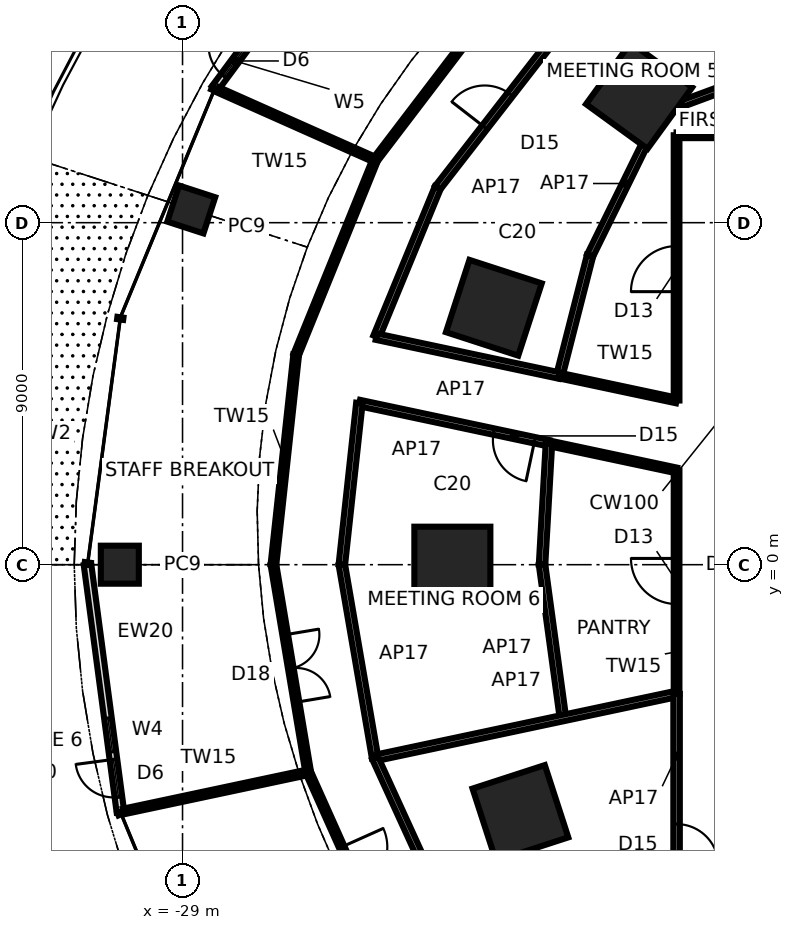
"""IFC4 building model, lengths in metres.
Left out: names, types, materials, properties, quantities, classifications, styles, units other than length and angle.
Written with IfcOpenShell. Run it as: python <this file> out.ifc"""

import sys

from ifc_helpers import new_model, si_unit, direction, frame, frame_2d, origin, origin_2d, place, context, subcontext, project, spatial, rectangle, extrude, element, fill, save


model = new_model("IFC4")
c1 = context("Model", 3, precision=1e-05, world=origin(), true_north=direction((0.0, 1.0)))
c2 = subcontext(c1, "Body", "Model", "MODEL_VIEW")
j1 = project(units=[si_unit("LENGTHUNIT", "METRE"), si_unit("PLANEANGLEUNIT", "RADIAN")], contexts=[c1])
p1 = place(None, origin())
s1 = spatial("IfcSite", under=j1, at=p1, CompositionType="ELEMENT")
p2 = place(p1, origin())
s2 = spatial("IfcBuilding", under=s1, at=p2, CompositionType="ELEMENT")
p3 = place(p2, frame((0.0, 0.0, 15.1)))
s3 = spatial("IfcBuildingStorey", under=s2, at=p3, CompositionType="ELEMENT", Elevation=15.1)
for number, where, z_axis, x_axis in (
    (1, (-16.986, 12.341, 0.0), (0.0, 0.0, 1.0), (-0.809, 0.588, 0.0)),
    (2, (-20.808, 6.761, 0.0), (0.0, 0.0, 1.0), (-0.951, 0.309, 0.0)),
    (3, (-21.9, 0.0, 0.0), (0.0, 0.0, 1.0), (-1.0, 0.0, 0.0)),
    (4, (-20.109, -6.534, 0.0), (0.0, 0.0, 1.0), (-0.951, -0.309, 0.0)),
):
    element("IfcColumn", number, at=place(p3, frame(where, z_axis=z_axis, x_axis=x_axis)), inside=s3, PredefinedType="COLUMN", context=c2, shape_type="SweptSolid", body=[
        extrude(rectangle(XDim=2.0, YDim=2.0, at=origin_2d()), origin(), (0.0, 0.0, 1.0), 4.5),
    ])
for number, where, z_axis, x_axis in (
    (5, (-28.77, 9.348, 0.0), (0.0, 0.0, 1.0), (-0.951, 0.309, 0.0)),
    (6, (-30.65, 0.0, 0.0), (0.0, 0.0, 1.0), (-1.0, 0.0, 0.0)),
):
    element("IfcColumn", number, at=place(p3, frame(where, z_axis=z_axis, x_axis=x_axis)), inside=s3, PredefinedType="COLUMN", context=c2, shape_type="SweptSolid", body=[
        extrude(rectangle(XDim=1.0, YDim=1.0, at=origin_2d()), origin(), (0.0, 0.0, 1.0), 4.5),
    ])
p4 = place(p3, frame((-24.332, 17.678, 0.0), z_axis=(0.0, 0.0, 1.0), x_axis=(-0.595729578383, -0.803185077949, 0.0)))
e7 = element("IfcWall", 7, at=p4, inside=s3, PredefinedType="SOLIDWALL", context=c2, shape_type="SweptSolid", body=[
    extrude(rectangle(XDim=6.407, YDim=0.2, at=frame_2d((3.203, 0.0))), origin(), (0.0, 0.0, 1.0), 4.3),
])
p5 = place(p4, frame((5.007, 0.0, 0.0)))
e8 = element("IfcOpeningElement", 8, at=p5, cuts=e7, PredefinedType="OPENING", context=c2, shape_type="SweptSolid", body=[
    extrude(rectangle(XDim=1.0, YDim=2.4, at=frame_2d((0.5, 1.2))), frame((0.0, 0.11, 0.0), z_axis=(0.0, -1.0, 0.0), x_axis=(1.0, 0.0, 0.0)), (0.0, 0.0, 1.0), 0.22),
])
p6 = place(p4, frame((3.907, 0.0, 0.3)))
e9 = element("IfcOpeningElement", 9, at=p6, cuts=e7, PredefinedType="OPENING", context=c2, shape_type="SweptSolid", body=[
    extrude(rectangle(XDim=0.9, YDim=2.1, at=frame_2d((0.45, 1.05))), frame((0.0, 0.11, 0.0), z_axis=(0.0, -1.0, 0.0), x_axis=(1.0, 0.0, 0.0)), (0.0, 0.0, 1.0), 0.22),
])
p7 = place(p4, frame((5.007, 0.0, 2.7)))
e10 = element("IfcOpeningElement", 10, at=p7, cuts=e7, PredefinedType="OPENING", context=c2, shape_type="SweptSolid", body=[
    extrude(rectangle(XDim=1.0, YDim=0.6, at=frame_2d((0.5, 0.3))), frame((0.0, 0.11, 0.0), z_axis=(0.0, -1.0, 0.0), x_axis=(1.0, 0.0, 0.0)), (0.0, 0.0, 1.0), 0.22),
])
p8 = place(p3, frame((-31.5, 0.0, 0.0), z_axis=(0.0, 0.0, 1.0), x_axis=(0.131830186359, -0.991272314737, 0.0)))
e11 = element("IfcWall", 11, at=p8, inside=s3, PredefinedType="SOLIDWALL", context=c2, shape_type="SweptSolid", body=[
    extrude(rectangle(XDim=6.569, YDim=0.2, at=frame_2d((3.284, 0.0))), origin(), (0.0, 0.0, 1.0), 4.3),
])
p9 = place(p8, frame((5.169, 0.0, 0.0)))
e12 = element("IfcOpeningElement", 12, at=p9, cuts=e11, PredefinedType="OPENING", context=c2, shape_type="SweptSolid", body=[
    extrude(rectangle(XDim=1.0, YDim=2.4, at=frame_2d((0.5, 1.2))), frame((0.0, 0.11, 0.0), z_axis=(0.0, -1.0, 0.0), x_axis=(1.0, 0.0, 0.0)), (0.0, 0.0, 1.0), 0.22),
])
p10 = place(p8, frame((4.069, 0.0, 0.3)))
e13 = element("IfcOpeningElement", 13, at=p10, cuts=e11, PredefinedType="OPENING", context=c2, shape_type="SweptSolid", body=[
    extrude(rectangle(XDim=0.9, YDim=2.1, at=frame_2d((0.45, 1.05))), frame((0.0, 0.11, 0.0), z_axis=(0.0, -1.0, 0.0), x_axis=(1.0, 0.0, 0.0)), (0.0, 0.0, 1.0), 0.22),
])
p11 = place(p8, frame((5.169, 0.0, 2.7)))
e14 = element("IfcOpeningElement", 14, at=p11, cuts=e11, PredefinedType="OPENING", context=c2, shape_type="SweptSolid", body=[
    extrude(rectangle(XDim=1.0, YDim=0.6, at=frame_2d((0.5, 0.3))), frame((0.0, 0.11, 0.0), z_axis=(0.0, -1.0, 0.0), x_axis=(1.0, 0.0, 0.0)), (0.0, 0.0, 1.0), 0.22),
])
p12 = place(p3, frame((-16.0, 2.481, 0.0), z_axis=(0.0, 0.0, 1.0), x_axis=(0.0, -1.0, 0.0)))
e15 = element("IfcWall", 15, at=p12, inside=s3, PredefinedType="PARTITIONING", context=c2, shape_type="SweptSolid", body=[
    extrude(rectangle(XDim=5.882, YDim=0.15, at=frame_2d((2.941, 0.0))), origin(), (0.0, 0.0, 1.0), 4.3),
])
p13 = place(p12, frame((2.316, 0.0, 0.0)))
e16 = element("IfcOpeningElement", 16, at=p13, cuts=e15, PredefinedType="OPENING", context=c2, shape_type="SweptSolid", body=[
    extrude(rectangle(XDim=1.2, YDim=2.4, at=frame_2d((0.6, 1.2))), frame((0.0, 0.085, 0.0), z_axis=(0.0, -1.0, 0.0), x_axis=(1.0, 0.0, 0.0)), (0.0, 0.0, 1.0), 0.17),
])
p14 = place(p3, frame((-23.932, -5.087, 0.0), z_axis=(0.0, 0.0, 1.0), x_axis=(-0.169704177239, 0.985495049317, 0.0)))
e17 = element("IfcWall", 17, at=p14, inside=s3, PredefinedType="PARTITIONING", context=c2, shape_type="SweptSolid", body=[
    extrude(rectangle(XDim=5.162, YDim=0.17, at=frame_2d((2.581, 0.0))), origin(), (0.0, 0.0, 1.0), 4.3),
])
p15 = place(p3, frame((-26.608, 0.0, 0.0), z_axis=(0.0, 0.0, 1.0), x_axis=(0.165292631836, -0.986244566961, 0.0)))
e18 = element("IfcWall", 18, at=p15, inside=s3, PredefinedType="PARTITIONING", context=c2, shape_type="SweptSolid", body=[
    extrude(rectangle(XDim=5.537, YDim=0.15, at=frame_2d((2.769, 0.0))), origin(), (0.0, 0.0, 1.0), 4.3),
])
p16 = place(p15, frame((1.869, 0.0, 0.0)))
e19 = element("IfcOpeningElement", 19, at=p16, cuts=e18, PredefinedType="OPENING", context=c2, shape_type="SweptSolid", body=[
    extrude(rectangle(XDim=1.8, YDim=2.4, at=frame_2d((0.9, 1.2))), frame((0.0, 0.085, 0.0), z_axis=(0.0, -1.0, 0.0), x_axis=(1.0, 0.0, 0.0)), (0.0, 0.0, 1.0), 0.17),
])
p17 = place(p3, frame((-18.99, -4.036, 0.0), z_axis=(0.0, 0.0, 1.0), x_axis=(-0.135024948545, 0.990842198975, 0.0)))
e20 = element("IfcWall", 20, at=p17, inside=s3, PredefinedType="PARTITIONING", context=c2, shape_type="SweptSolid", body=[
    extrude(rectangle(XDim=4.074, YDim=0.17, at=frame_2d((2.037, 0.0))), origin(), (0.0, 0.0, 1.0), 4.3),
])
p18 = place(p3, frame((-23.932, -5.087, 0.0), z_axis=(0.0, 0.0, 1.0), x_axis=(0.97814737229, 0.20791276556, 0.0)))
e21 = element("IfcWall", 21, at=p18, inside=s3, PredefinedType="PARTITIONING", context=c2, shape_type="SweptSolid", body=[
    extrude(rectangle(XDim=8.109, YDim=0.17, at=frame_2d((4.055, 0.0))), origin(), (0.0, 0.0, 1.0), 4.3),
])
p19 = place(p3, frame((-25.693, -5.461, 0.0), z_axis=(0.0, 0.0, 1.0), x_axis=(-0.978146743391, -0.207915724259, 0.0)))
e22 = element("IfcWall", 22, at=p19, inside=s3, PredefinedType="PARTITIONING", context=c2, shape_type="SweptSolid", body=[
    extrude(rectangle(XDim=4.972, YDim=0.15, at=frame_2d((2.486, 0.0))), origin(), (0.0, 0.0, 1.0), 4.3),
])
p20 = place(p3, frame((-21.816, -9.713, 0.0), z_axis=(0.0, 0.0, 1.0), x_axis=(-0.415942352912, 0.909390982501, 0.0)))
e23 = element("IfcWall", 23, at=p20, inside=s3, PredefinedType="PARTITIONING", context=c2, shape_type="SweptSolid", body=[
    extrude(rectangle(XDim=5.087, YDim=0.17, at=frame_2d((2.543, 0.0))), origin(), (0.0, 0.0, 1.0), 4.3),
])
p21 = place(p3, frame((-25.693, -5.461, 0.0), z_axis=(0.0, 0.0, 1.0), x_axis=(0.408737544403, -0.912651970795, 0.0)))
e24 = element("IfcWall", 24, at=p21, inside=s3, PredefinedType="PARTITIONING", context=c2, shape_type="SweptSolid", body=[
    extrude(rectangle(XDim=5.461, YDim=0.15, at=frame_2d((2.73, 0.0))), origin(), (0.0, 0.0, 1.0), 4.3),
])
p22 = place(p21, frame((2.156, 0.0, 0.0)))
e25 = element("IfcOpeningElement", 25, at=p22, cuts=e24, PredefinedType="OPENING", context=c2, shape_type="SweptSolid", body=[
    extrude(rectangle(XDim=1.2, YDim=2.4, at=frame_2d((0.6, 1.2))), frame((0.0, 0.085, 0.0), z_axis=(0.0, -1.0, 0.0), x_axis=(1.0, 0.0, 0.0)), (0.0, 0.0, 1.0), 0.17),
])
p23 = place(p3, frame((-16.0, -3.401, 0.0), z_axis=(0.0, 0.0, 1.0), x_axis=(0.0, -1.0, 0.0)))
e26 = element("IfcWall", 26, at=p23, inside=s3, PredefinedType="PARTITIONING", context=c2, shape_type="SweptSolid", body=[
    extrude(rectangle(XDim=7.899, YDim=0.17, at=frame_2d((3.95, 0.0))), origin(), (0.0, 0.0, 1.0), 4.3),
])
p24 = place(p23, frame((3.425, 0.0, 0.0)))
e27 = element("IfcOpeningElement", 27, at=p24, cuts=e26, PredefinedType="OPENING", context=c2, shape_type="SweptSolid", body=[
    extrude(rectangle(XDim=1.1, YDim=2.4, at=frame_2d((0.55, 1.2))), frame((0.0, 0.095, 0.0), z_axis=(0.0, -1.0, 0.0), x_axis=(1.0, 0.0, 0.0)), (0.0, 0.0, 1.0), 0.19),
])
p25 = place(p3, frame((6.524, 11.3, 0.0), z_axis=(0.0, 0.0, 1.0), x_axis=(-1.0, 0.0, 0.0)))
e28 = element("IfcWall", 28, at=p25, inside=s3, PredefinedType="PARTITIONING", context=c2, shape_type="SweptSolid", body=[
    extrude(rectangle(XDim=22.524, YDim=0.15, at=frame_2d((11.262, 0.0))), origin(), (0.0, 0.0, 1.0), 4.3),
])
p26 = place(p25, frame((10.393, 0.0, 0.0)))
e29 = element("IfcOpeningElement", 29, at=p26, cuts=e28, PredefinedType="OPENING", context=c2, shape_type="SweptSolid", body=[
    extrude(rectangle(XDim=1.2, YDim=2.4, at=frame_2d((0.6, 1.2))), frame((0.0, 0.085, 0.0), z_axis=(0.0, -1.0, 0.0), x_axis=(1.0, 0.0, 0.0)), (0.0, 0.0, 1.0), 0.17),
])
p27 = place(p25, frame((2.068, 0.0, 0.0)))
e30 = element("IfcOpeningElement", 30, at=p27, cuts=e28, PredefinedType="OPENING", context=c2, shape_type="SweptSolid", body=[
    extrude(rectangle(XDim=1.2, YDim=2.4, at=frame_2d((0.6, 1.2))), frame((0.0, 0.085, 0.0), z_axis=(0.0, -1.0, 0.0), x_axis=(1.0, 0.0, 0.0)), (0.0, 0.0, 1.0), 0.17),
])
p28 = place(p3, frame((-12.156, 13.5, 0.0), z_axis=(0.0, 0.0, 1.0), x_axis=(-0.669135077133, 0.74314079995, 0.0)))
e31 = element("IfcWall", 31, at=p28, inside=s3, PredefinedType="PARTITIONING", context=c2, shape_type="SweptSolid", body=[
    extrude(rectangle(XDim=4.671, YDim=0.17, at=frame_2d((2.336, 0.0))), origin(), (0.0, 0.0, 1.0), 4.3),
])
p29 = place(p3, frame((-16.413, 11.925, 0.0), z_axis=(0.0, 0.0, 1.0), x_axis=(0.937814922048, 0.34713566798, 0.0)))
e32 = element("IfcWall", 32, at=p29, inside=s3, PredefinedType="PARTITIONING", context=c2, shape_type="SweptSolid", body=[
    extrude(rectangle(XDim=4.539, YDim=0.17, at=frame_2d((2.27, 0.0))), origin(), (0.0, 0.0, 1.0), 4.3),
])
p30 = place(p3, frame((-18.276, 8.137, 0.0), z_axis=(0.0, 0.0, 1.0), x_axis=(0.44142043443, 0.897300395669, 0.0)))
e33 = element("IfcWall", 33, at=p30, inside=s3, PredefinedType="PARTITIONING", context=c2, shape_type="SweptSolid", body=[
    extrude(rectangle(XDim=4.221, YDim=0.17, at=frame_2d((2.111, 0.0))), origin(), (0.0, 0.0, 1.0), 4.3),
])
p31 = place(p3, frame((-20.627, 14.986, 0.0), z_axis=(0.0, 0.0, 1.0), x_axis=(-0.606135035954, -0.795361753034, 0.0)))
e34 = element("IfcWall", 34, at=p31, inside=s3, PredefinedType="PARTITIONING", context=c2, shape_type="SweptSolid", body=[
    extrude(rectangle(XDim=5.447, YDim=0.15, at=frame_2d((2.724, 0.0))), origin(), (0.0, 0.0, 1.0), 4.3),
])
p32 = place(p3, frame((-22.284, 9.921, 0.0), z_axis=(0.0, 0.0, 1.0), x_axis=(0.613607456707, 0.789611226537, 0.0)))
e35 = element("IfcWall", 35, at=p32, inside=s3, PredefinedType="PARTITIONING", context=c2, shape_type="SweptSolid", body=[
    extrude(rectangle(XDim=5.074, YDim=0.17, at=frame_2d((2.537, 0.0))), origin(), (0.0, 0.0, 1.0), 4.3),
])
p33 = place(p32, frame((2.012, 0.0, 0.0)))
e36 = element("IfcOpeningElement", 36, at=p33, cuts=e35, PredefinedType="OPENING", context=c2, shape_type="SweptSolid", body=[
    extrude(rectangle(XDim=1.1, YDim=2.4, at=frame_2d((0.55, 1.2))), frame((0.0, 0.095, 0.0), z_axis=(0.0, -1.0, 0.0), x_axis=(1.0, 0.0, 0.0)), (0.0, 0.0, 1.0), 0.19),
])
p34 = place(p3, frame((-16.0, 11.3, 0.0), z_axis=(0.0, 0.0, 1.0), x_axis=(0.0, -1.0, 0.0)))
e37 = element("IfcWall", 37, at=p34, inside=s3, PredefinedType="PARTITIONING", context=c2, shape_type="SweptSolid", body=[
    extrude(rectangle(XDim=6.979, YDim=0.15, at=frame_2d((3.49, 0.0))), origin(), (0.0, 0.0, 1.0), 4.3),
])
p35 = place(p34, frame((2.915, 0.0, 0.0)))
e38 = element("IfcOpeningElement", 38, at=p35, cuts=e37, PredefinedType="OPENING", context=c2, shape_type="SweptSolid", body=[
    extrude(rectangle(XDim=1.2, YDim=2.4, at=frame_2d((0.6, 1.2))), frame((0.0, 0.085, 0.0), z_axis=(0.0, -1.0, 0.0), x_axis=(1.0, 0.0, 0.0)), (0.0, 0.0, 1.0), 0.17),
])
p36 = place(p3, frame((-23.928, 10.654, 0.0), z_axis=(0.0, 0.0, 1.0), x_axis=(-0.913547449471, 0.406732169326, 0.0)))
e39 = element("IfcWall", 39, at=p36, inside=s3, PredefinedType="PARTITIONING", context=c2, shape_type="SweptSolid", body=[
    extrude(rectangle(XDim=4.54, YDim=0.15, at=frame_2d((2.27, 0.0))), origin(), (0.0, 0.0, 1.0), 4.3),
])
p37 = place(p3, frame((-19.083, 4.976, 0.0), z_axis=(0.0, 0.0, 1.0), x_axis=(0.247568605717, 0.968870365665, 0.0)))
e40 = element("IfcWall", 40, at=p37, inside=s3, PredefinedType="PARTITIONING", context=c2, shape_type="SweptSolid", body=[
    extrude(rectangle(XDim=3.262, YDim=0.17, at=frame_2d((1.631, 0.0))), origin(), (0.0, 0.0, 1.0), 4.3),
])
p38 = place(p3, frame((-23.9, 6.0, 0.0), z_axis=(0.0, 0.0, 1.0), x_axis=(0.381027738685, 0.92456360644, 0.0)))
e41 = element("IfcWall", 41, at=p38, inside=s3, PredefinedType="PARTITIONING", context=c2, shape_type="SweptSolid", body=[
    extrude(rectangle(XDim=4.241, YDim=0.17, at=frame_2d((2.121, 0.0))), origin(), (0.0, 0.0, 1.0), 4.3),
])
p39 = place(p3, frame((-23.928, 10.654, 0.0), z_axis=(0.0, 0.0, 1.0), x_axis=(-0.376134336796, -0.92656514109, 0.0)))
e42 = element("IfcWall", 42, at=p39, inside=s3, PredefinedType="PARTITIONING", context=c2, shape_type="SweptSolid", body=[
    extrude(rectangle(XDim=5.531, YDim=0.15, at=frame_2d((2.766, 0.0))), origin(), (0.0, 0.0, 1.0), 4.3),
])
p40 = place(p3, frame((-16.0, 4.321, 0.0), z_axis=(0.0, 0.0, 1.0), x_axis=(-0.978156882567, 0.207868018433, 0.0)))
e43 = element("IfcWall", 43, at=p40, inside=s3, PredefinedType="PARTITIONING", context=c2, shape_type="SweptSolid", body=[
    extrude(rectangle(XDim=3.152, YDim=0.15, at=frame_2d((1.576, 0.0))), origin(), (0.0, 0.0, 1.0), 4.3),
])
p41 = place(p3, frame((-19.083, 4.976, 0.0), z_axis=(0.0, 0.0, 1.0), x_axis=(-0.97814070171, 0.207944145528, 0.0)))
e44 = element("IfcWall", 44, at=p41, inside=s3, PredefinedType="PARTITIONING", context=c2, shape_type="SweptSolid", body=[
    extrude(rectangle(XDim=4.924, YDim=0.17, at=frame_2d((2.462, 0.0))), origin(), (0.0, 0.0, 1.0), 4.3),
])
p42 = place(p3, frame((-24.346, 4.255, 0.0), z_axis=(0.0, 0.0, 1.0), x_axis=(0.978143029593, -0.20793319518, 0.0)))
e45 = element("IfcWall", 45, at=p42, inside=s3, PredefinedType="PARTITIONING", context=c2, shape_type="SweptSolid", body=[
    extrude(rectangle(XDim=5.099, YDim=0.17, at=frame_2d((2.55, 0.0))), origin(), (0.0, 0.0, 1.0), 4.3),
])
p43 = place(p42, frame((3.616, 0.0, 0.0)))
e46 = element("IfcOpeningElement", 46, at=p43, cuts=e45, PredefinedType="OPENING", context=c2, shape_type="SweptSolid", body=[
    extrude(rectangle(XDim=1.1, YDim=2.4, at=frame_2d((0.55, 1.2))), frame((0.0, 0.095, 0.0), z_axis=(0.0, -1.0, 0.0), x_axis=(1.0, 0.0, 0.0)), (0.0, 0.0, 1.0), 0.19),
])
p44 = place(p3, frame((-19.358, 3.195, 0.0), z_axis=(0.0, 0.0, 1.0), x_axis=(0.978143486216, -0.207931047161, 0.0)))
e47 = element("IfcWall", 47, at=p44, inside=s3, PredefinedType="PARTITIONING", context=c2, shape_type="SweptSolid", body=[
    extrude(rectangle(XDim=3.433, YDim=0.15, at=frame_2d((1.717, 0.0))), origin(), (0.0, 0.0, 1.0), 4.3),
])
p45 = place(p3, frame((-26.009, 5.528, 0.0), z_axis=(0.0, 0.0, 1.0), x_axis=(-0.107698829118, -0.994183565649, 0.0)))
e48 = element("IfcWall", 48, at=p45, inside=s3, PredefinedType="PARTITIONING", context=c2, shape_type="SweptSolid", body=[
    extrude(rectangle(XDim=5.561, YDim=0.15, at=frame_2d((2.78, 0.0))), origin(), (0.0, 0.0, 1.0), 4.3),
])
p46 = place(p3, frame((-24.808, 0.0, 0.0), z_axis=(0.0, 0.0, 1.0), x_axis=(0.107983193609, 0.994152719605, 0.0)))
e49 = element("IfcWall", 49, at=p46, inside=s3, PredefinedType="PARTITIONING", context=c2, shape_type="SweptSolid", body=[
    extrude(rectangle(XDim=4.28, YDim=0.17, at=frame_2d((2.14, 0.0))), origin(), (0.0, 0.0, 1.0), 4.3),
])
p47 = place(p3, frame((-19.54, 0.0, 0.0), z_axis=(0.0, 0.0, 1.0), x_axis=(0.056843363857, 0.998383108824, 0.0)))
e50 = element("IfcWall", 50, at=p47, inside=s3, PredefinedType="PARTITIONING", context=c2, shape_type="SweptSolid", body=[
    extrude(rectangle(XDim=3.2, YDim=0.17, at=frame_2d((1.6, 0.0))), origin(), (0.0, 0.0, 1.0), 4.3),
])
p48 = place(p5, frame((1.0, 0.0, 0.0), z_axis=(0.0, 0.0, 1.0), x_axis=(-1.0, 0.0, 0.0)))
e51 = element("IfcDoor", 51, at=p48, inside=s3, OperationType="SINGLE_SWING_RIGHT", PredefinedType="DOOR", context=c2, shape_type="SweptSolid", body=[
    extrude(rectangle(XDim=1.0, YDim=2.4, at=frame_2d((0.5, 1.2))), frame((0.0, 0.025, 0.0), z_axis=(0.0, -1.0, 0.0), x_axis=(1.0, 0.0, 0.0)), (0.0, 0.0, 1.0), 0.05),
])
fill(e8, e51)
p49 = place(p7, origin())
e52 = element("IfcWindow", 52, at=p49, inside=s3, PartitioningType="SINGLE_PANEL", PredefinedType="WINDOW", context=c2, shape_type="SweptSolid", body=[
    extrude(rectangle(XDim=1.0, YDim=0.6, at=frame_2d((0.5, 0.3))), frame((0.0, 0.03, 0.0), z_axis=(0.0, -1.0, 0.0), x_axis=(1.0, 0.0, 0.0)), (0.0, 0.0, 1.0), 0.06),
])
fill(e10, e52)
p50 = place(p9, frame((1.0, 0.0, 0.0), z_axis=(0.0, 0.0, 1.0), x_axis=(-1.0, 0.0, 0.0)))
e53 = element("IfcDoor", 53, at=p50, inside=s3, OperationType="SINGLE_SWING_RIGHT", PredefinedType="DOOR", context=c2, shape_type="SweptSolid", body=[
    extrude(rectangle(XDim=1.0, YDim=2.4, at=frame_2d((0.5, 1.2))), frame((0.0, 0.025, 0.0), z_axis=(0.0, -1.0, 0.0), x_axis=(1.0, 0.0, 0.0)), (0.0, 0.0, 1.0), 0.05),
])
fill(e12, e53)
p51 = place(p10, origin())
e54 = element("IfcWindow", 54, at=p51, inside=s3, PartitioningType="SINGLE_PANEL", PredefinedType="WINDOW", context=c2, shape_type="SweptSolid", body=[
    extrude(rectangle(XDim=0.9, YDim=2.1, at=frame_2d((0.45, 1.05))), frame((0.0, 0.03, 0.0), z_axis=(0.0, -1.0, 0.0), x_axis=(1.0, 0.0, 0.0)), (0.0, 0.0, 1.0), 0.06),
])
fill(e13, e54)
p52 = place(p11, origin())
e55 = element("IfcWindow", 55, at=p52, inside=s3, PartitioningType="SINGLE_PANEL", PredefinedType="WINDOW", context=c2, shape_type="SweptSolid", body=[
    extrude(rectangle(XDim=1.0, YDim=0.6, at=frame_2d((0.5, 0.3))), frame((0.0, 0.03, 0.0), z_axis=(0.0, -1.0, 0.0), x_axis=(1.0, 0.0, 0.0)), (0.0, 0.0, 1.0), 0.06),
])
fill(e14, e55)
p53 = place(p24, origin())
e56 = element("IfcDoor", 56, at=p53, inside=s3, OperationType="SINGLE_SWING_RIGHT", PredefinedType="DOOR", context=c2, shape_type="SweptSolid", body=[
    extrude(rectangle(XDim=1.1, YDim=2.4, at=frame_2d((0.55, 1.2))), frame((0.0, 0.025, 0.0), z_axis=(0.0, -1.0, 0.0), x_axis=(1.0, 0.0, 0.0)), (0.0, 0.0, 1.0), 0.05),
])
fill(e27, e56)
p54 = place(p35, frame((1.2, 0.0, 0.0), z_axis=(0.0, 0.0, 1.0), x_axis=(-1.0, 0.0, 0.0)))
e57 = element("IfcDoor", 57, at=p54, inside=s3, OperationType="SINGLE_SWING_LEFT", PredefinedType="DOOR", context=c2, shape_type="SweptSolid", body=[
    extrude(rectangle(XDim=1.2, YDim=2.4, at=frame_2d((0.6, 1.2))), frame((0.0, 0.025, 0.0), z_axis=(0.0, -1.0, 0.0), x_axis=(1.0, 0.0, 0.0)), (0.0, 0.0, 1.0), 0.05),
])
fill(e38, e57)
p55 = place(p13, frame((1.2, 0.0, 0.0), z_axis=(0.0, 0.0, 1.0), x_axis=(-1.0, 0.0, 0.0)))
e58 = element("IfcDoor", 58, at=p55, inside=s3, OperationType="SINGLE_SWING_RIGHT", PredefinedType="DOOR", context=c2, shape_type="SweptSolid", body=[
    extrude(rectangle(XDim=1.2, YDim=2.4, at=frame_2d((0.6, 1.2))), frame((0.0, 0.025, 0.0), z_axis=(0.0, -1.0, 0.0), x_axis=(1.0, 0.0, 0.0)), (0.0, 0.0, 1.0), 0.05),
])
fill(e16, e58)
p56 = place(p33, origin())
e59 = element("IfcDoor", 59, at=p56, inside=s3, OperationType="SINGLE_SWING_LEFT", PredefinedType="DOOR", context=c2, shape_type="SweptSolid", body=[
    extrude(rectangle(XDim=1.1, YDim=2.4, at=frame_2d((0.55, 1.2))), frame((0.0, 0.025, 0.0), z_axis=(0.0, -1.0, 0.0), x_axis=(1.0, 0.0, 0.0)), (0.0, 0.0, 1.0), 0.05),
])
fill(e36, e59)
p57 = place(p43, frame((1.1, 0.0, 0.0), z_axis=(0.0, 0.0, 1.0), x_axis=(-1.0, 0.0, 0.0)))
e60 = element("IfcDoor", 60, at=p57, inside=s3, OperationType="SINGLE_SWING_LEFT", PredefinedType="DOOR", context=c2, shape_type="SweptSolid", body=[
    extrude(rectangle(XDim=1.1, YDim=2.4, at=frame_2d((0.55, 1.2))), frame((0.0, 0.025, 0.0), z_axis=(0.0, -1.0, 0.0), x_axis=(1.0, 0.0, 0.0)), (0.0, 0.0, 1.0), 0.05),
])
fill(e46, e60)
p58 = place(p16, origin())
e61 = element("IfcDoor", 61, at=p58, inside=s3, OperationType="DOUBLE_DOOR_SINGLE_SWING", PredefinedType="DOOR", context=c2, shape_type="SweptSolid", body=[
    extrude(rectangle(XDim=1.8, YDim=2.4, at=frame_2d((0.9, 1.2))), frame((0.0, 0.025, 0.0), z_axis=(0.0, -1.0, 0.0), x_axis=(1.0, 0.0, 0.0)), (0.0, 0.0, 1.0), 0.05),
])
fill(e19, e61)
p59 = place(p22, origin())
e62 = element("IfcDoor", 62, at=p59, inside=s3, OperationType="SINGLE_SWING_LEFT", PredefinedType="DOOR", context=c2, shape_type="SweptSolid", body=[
    extrude(rectangle(XDim=1.2, YDim=2.4, at=frame_2d((0.6, 1.2))), frame((0.0, 0.025, 0.0), z_axis=(0.0, -1.0, 0.0), x_axis=(1.0, 0.0, 0.0)), (0.0, 0.0, 1.0), 0.05),
])
fill(e25, e62)
save(model, sys.argv[1])
